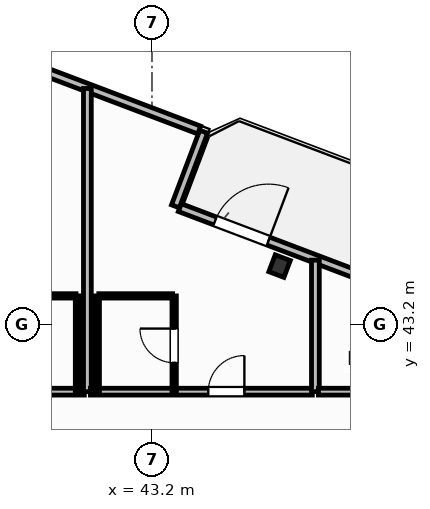
"""IFC4 building model, lengths in metres.
Left out: names, types, materials, properties, quantities, classifications, styles, units other than length and angle.
Written with IfcOpenShell. Run it as: python <this file> out.ifc"""

import sys

from ifc_helpers import new_model, si_unit, direction, frame, frame_2d, origin, origin_2d, place, context, subcontext, project, spatial, rectangle, i_section, extrude, element, fill, save


model = new_model("IFC4")
c1 = context("Model", 3, precision=1e-05, world=origin(), true_north=direction((0.0, 1.0)))
c2 = subcontext(c1, "Body", "Model", "MODEL_VIEW")
j1 = project(units=[si_unit("LENGTHUNIT", "METRE"), si_unit("PLANEANGLEUNIT", "RADIAN")], contexts=[c1])
p1 = place(None, origin())
s1 = spatial("IfcSite", under=j1, at=p1, CompositionType="ELEMENT")
p2 = place(p1, origin())
s2 = spatial("IfcBuilding", under=s1, at=p2, CompositionType="ELEMENT")
p3 = place(p2, frame((0.0, 0.0, 87.3)))
s3 = spatial("IfcBuildingStorey", under=s2, at=p3, CompositionType="ELEMENT", Elevation=87.3)
p4 = place(p3, frame((46.557, 44.734, 0.0), z_axis=(0.0, 0.0, 1.0), x_axis=(0.935221751401, -0.354062530786, 0.0)))
e1 = element("IfcColumn", 1, at=p4, inside=s3, PredefinedType="COLUMN", context=c2, shape_type="SweptSolid", body=[
    extrude(i_section(OverallWidth=0.424, OverallDepth=0.474, WebThickness=0.048, FlangeThickness=0.077, FilletRadius=0.025, at=origin_2d()), origin(), (0.0, 0.0, 1.0), 3.7),
])
p5 = place(p3, frame((43.932, 46.273, 0.0), z_axis=(0.0, 0.0, 1.0), x_axis=(0.93521416643, -0.354082565101, 0.0)))
e2 = element("IfcWall", 2, at=p5, inside=s3, PredefinedType="SOLIDWALL", context=c2, shape_type="SweptSolid", body=[
    extrude(rectangle(XDim=6.0, YDim=0.22, at=frame_2d((3.0, 0.0))), origin(), (0.0, 0.0, 1.0), 2.73),
])
p6 = place(p5, frame((0.992, 0.0, 0.0)))
e3 = element("IfcOpeningElement", 3, at=p6, cuts=e2, PredefinedType="OPENING", context=c2, shape_type="SweptSolid", body=[
    extrude(rectangle(XDim=1.5, YDim=2.25, at=frame_2d((0.75, 1.125))), frame((0.0, 0.12, 0.0), z_axis=(0.0, -1.0, 0.0), x_axis=(1.0, 0.0, 0.0)), (0.0, 0.0, 1.0), 0.24),
])
p7 = place(p3, frame((43.817, 46.306, 0.0), z_axis=(0.0, 0.0, 1.0), x_axis=(0.353988291547, 0.935249854022, 0.0)))
e4 = element("IfcWall", 4, at=p7, inside=s3, PredefinedType="SOLIDWALL", context=c2, shape_type="SweptSolid", body=[
    extrude(rectangle(XDim=2.1, YDim=0.22, at=frame_2d((1.05, 0.0))), origin(), (0.0, 0.0, 1.0), 2.73),
])
p8 = place(p3, frame((44.443, 48.314, 0.0), z_axis=(0.0, 0.0, 1.0), x_axis=(-0.935226988293, 0.354048697735, 0.0)))
e5 = element("IfcWall", 5, at=p8, inside=s3, PredefinedType="SOLIDWALL", context=c2, shape_type="SweptSolid", body=[
    extrude(rectangle(XDim=8.035, YDim=0.22, at=frame_2d((4.018, 0.0))), origin(), (0.0, 0.0, 1.0), 2.73),
])
p9 = place(p8, frame((4.597, 0.0, 0.8)))
e6 = element("IfcOpeningElement", 6, at=p9, cuts=e5, PredefinedType="OPENING", context=c2, shape_type="SweptSolid", body=[
    extrude(rectangle(XDim=1.65, YDim=1.65, at=frame_2d((0.825, 0.825))), frame((0.0, 0.12, 0.0), z_axis=(0.0, -1.0, 0.0), x_axis=(1.0, 0.0, 0.0)), (0.0, 0.0, 1.0), 0.24),
])
p10 = place(p3, frame((35.58, 41.43, 0.0), z_axis=(0.0, 0.0, 1.0), x_axis=(1.0, 0.0, 0.0)))
e7 = element("IfcWall", 7, at=p10, inside=s3, PredefinedType="PARTITIONING", context=c2, shape_type="SweptSolid", body=[
    extrude(rectangle(XDim=5.84, YDim=0.18, at=frame_2d((2.92, 0.0))), origin(), (0.0, 0.0, 1.0), 3.45),
])
p11 = place(p10, frame((0.917, 0.0, 0.0)))
e8 = element("IfcOpeningElement", 8, at=p11, cuts=e7, PredefinedType="OPENING", context=c2, shape_type="SweptSolid", body=[
    extrude(rectangle(XDim=0.95, YDim=2.15, at=frame_2d((0.475, 1.075))), frame((0.0, 0.1, 0.0), z_axis=(0.0, -1.0, 0.0), x_axis=(1.0, 0.0, 0.0)), (0.0, 0.0, 1.0), 0.2),
])
p12 = place(p3, frame((39.256, 43.95, 0.0), z_axis=(0.0, 0.0, 1.0), x_axis=(1.0, 0.0, 0.0)))
e9 = element("IfcWall", 9, at=p12, inside=s3, PredefinedType="PARTITIONING", context=c2, shape_type="SweptSolid", body=[
    extrude(rectangle(XDim=1.944, YDim=0.115, at=frame_2d((0.972, 0.0))), origin(), (0.0, 0.0, 1.0), 2.972),
])
p13 = place(p3, frame((41.24, 41.43, 0.0), z_axis=(0.0, 0.0, 1.0), x_axis=(0.0, 1.0, 0.0)))
e10 = element("IfcWall", 10, at=p13, inside=s3, PredefinedType="PARTITIONING", context=c2, shape_type="SweptSolid", body=[
    extrude(rectangle(XDim=2.52, YDim=0.115, at=frame_2d((1.26, 0.0))), origin(), (0.0, 0.0, 1.0), 3.45),
])
p14 = place(p3, frame((41.5, 41.43, 0.0), z_axis=(0.0, 0.0, 1.0), x_axis=(0.0, 1.0, 0.0)))
e11 = element("IfcWall", 11, at=p14, inside=s3, PredefinedType="PARTITIONING", context=c2, shape_type="SweptSolid", body=[
    extrude(rectangle(XDim=7.977, YDim=0.205, at=frame_2d((3.989, 0.0))), origin(), (0.0, 0.0, 1.0), 3.45),
])
p15 = place(p3, frame((41.58, 41.43, 0.0), z_axis=(0.0, 0.0, 1.0), x_axis=(1.0, 0.0, 0.0)))
e12 = element("IfcWall", 12, at=p15, inside=s3, PredefinedType="PARTITIONING", context=c2, shape_type="SweptSolid", body=[
    extrude(rectangle(XDim=5.84, YDim=0.18, at=frame_2d((2.92, 0.0))), origin(), (0.0, 0.0, 1.0), 3.45),
])
p16 = place(p15, frame((3.101, 0.0, 0.0)))
e13 = element("IfcOpeningElement", 13, at=p16, cuts=e12, PredefinedType="OPENING", context=c2, shape_type="SweptSolid", body=[
    extrude(rectangle(XDim=0.95, YDim=2.15, at=frame_2d((0.475, 1.075))), frame((0.0, 0.1, 0.0), z_axis=(0.0, -1.0, 0.0), x_axis=(1.0, 0.0, 0.0)), (0.0, 0.0, 1.0), 0.2),
])
p17 = place(p3, frame((41.8, 43.95, 0.0), z_axis=(0.0, 0.0, 1.0), x_axis=(1.0, 0.0, 0.0)))
e14 = element("IfcWall", 14, at=p17, inside=s3, PredefinedType="PARTITIONING", context=c2, shape_type="SweptSolid", body=[
    extrude(rectangle(XDim=1.944, YDim=0.115, at=frame_2d((0.972, 0.0))), origin(), (0.0, 0.0, 1.0), 3.45),
])
p18 = place(p3, frame((43.784, 41.43, 0.0), z_axis=(0.0, 0.0, 1.0), x_axis=(0.0, 1.0, 0.0)))
e15 = element("IfcWall", 15, at=p18, inside=s3, PredefinedType="PARTITIONING", context=c2, shape_type="SweptSolid", body=[
    extrude(rectangle(XDim=2.52, YDim=0.115, at=frame_2d((1.26, 0.0))), origin(), (0.0, 0.0, 1.0), 3.45),
])
p19 = place(p18, frame((0.76, 0.0, 0.0)))
e16 = element("IfcOpeningElement", 16, at=p19, cuts=e15, PredefinedType="OPENING", context=c2, shape_type="SweptSolid", body=[
    extrude(rectangle(XDim=0.9, YDim=2.05, at=frame_2d((0.45, 1.025))), frame((0.0, 0.067, 0.0), z_axis=(0.0, -1.0, 0.0), x_axis=(1.0, 0.0, 0.0)), (0.0, 0.0, 1.0), 0.135),
])
p20 = place(p3, frame((41.76, 41.43, 0.0), z_axis=(0.0, 0.0, 1.0), x_axis=(0.0, 1.0, 0.0)))
e17 = element("IfcWall", 17, at=p20, inside=s3, PredefinedType="PARTITIONING", context=c2, shape_type="SweptSolid", body=[
    extrude(rectangle(XDim=2.52, YDim=0.115, at=frame_2d((1.26, 0.0))), origin(), (0.0, 0.0, 1.0), 3.45),
])
p21 = place(p3, frame((47.5, 41.43, 0.0), z_axis=(0.0, 0.0, 1.0), x_axis=(0.0, 1.0, 0.0)))
e18 = element("IfcWall", 18, at=p21, inside=s3, PredefinedType="PARTITIONING", context=c2, shape_type="SweptSolid", body=[
    extrude(rectangle(XDim=3.46, YDim=0.205, at=frame_2d((1.73, 0.0))), origin(), (0.0, 0.0, 1.0), 3.45),
])
p22 = place(p3, frame((47.58, 41.43, 0.0), z_axis=(0.0, 0.0, 1.0), x_axis=(1.0, 0.0, 0.0)))
e19 = element("IfcWall", 19, at=p22, inside=s3, PredefinedType="PARTITIONING", context=c2, shape_type="SweptSolid", body=[
    extrude(rectangle(XDim=5.84, YDim=0.18, at=frame_2d((2.92, 0.0))), origin(), (0.0, 0.0, 1.0), 3.45),
])
p23 = place(p22, frame((0.917, 0.0, 0.0)))
e20 = element("IfcOpeningElement", 20, at=p23, cuts=e19, PredefinedType="OPENING", context=c2, shape_type="SweptSolid", body=[
    extrude(rectangle(XDim=0.95, YDim=2.15, at=frame_2d((0.475, 1.075))), frame((0.0, 0.1, 0.0), z_axis=(0.0, -1.0, 0.0), x_axis=(1.0, 0.0, 0.0)), (0.0, 0.0, 1.0), 0.2),
])
p24 = place(p6, origin())
e21 = element("IfcDoor", 21, at=p24, inside=s3, OperationType="SINGLE_SWING_RIGHT", PredefinedType="DOOR", context=c2, shape_type="SweptSolid", body=[
    extrude(rectangle(XDim=1.5, YDim=2.25, at=frame_2d((0.75, 1.125))), frame((0.0, 0.025, 0.0), z_axis=(0.0, -1.0, 0.0), x_axis=(1.0, 0.0, 0.0)), (0.0, 0.0, 1.0), 0.05),
])
fill(e3, e21)
p25 = place(p16, origin())
e22 = element("IfcDoor", 22, at=p25, inside=s3, OperationType="SINGLE_SWING_RIGHT", PredefinedType="DOOR", context=c2, shape_type="SweptSolid", body=[
    extrude(rectangle(XDim=0.95, YDim=2.15, at=frame_2d((0.475, 1.075))), frame((0.0, 0.025, 0.0), z_axis=(0.0, -1.0, 0.0), x_axis=(1.0, 0.0, 0.0)), (0.0, 0.0, 1.0), 0.05),
])
fill(e13, e22)
p26 = place(p19, origin())
e23 = element("IfcDoor", 23, at=p26, inside=s3, OperationType="SINGLE_SWING_RIGHT", PredefinedType="DOOR", context=c2, shape_type="SweptSolid", body=[
    extrude(rectangle(XDim=0.9, YDim=2.05, at=frame_2d((0.45, 1.025))), frame((0.0, 0.025, 0.0), z_axis=(0.0, -1.0, 0.0), x_axis=(1.0, 0.0, 0.0)), (0.0, 0.0, 1.0), 0.05),
])
fill(e16, e23)
save(model, sys.argv[1])
